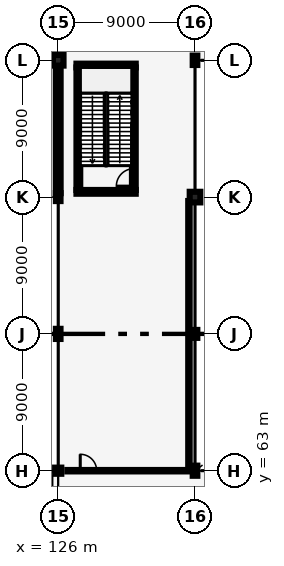
"""IFC4 building model, lengths in metres.
Left out: names, types, materials, properties, quantities, classifications, styles, units other than length and angle.
Written with IfcOpenShell. Run it as: python <this file> out.ifc"""

import sys

from ifc_helpers import new_model, si_unit, direction, frame, frame_2d, origin, origin_2d, place, context, subcontext, project, spatial, rectangle, hollow_circle, i_section, extrude, element, fill, save


model = new_model("IFC4")
c1 = context("Model", 3, precision=1e-05, world=origin(), true_north=direction((0.0, 1.0)))
c2 = subcontext(c1, "Body", "Model", "MODEL_VIEW")
j1 = project(units=[si_unit("LENGTHUNIT", "METRE"), si_unit("PLANEANGLEUNIT", "RADIAN")], contexts=[c1])
p1 = place(None, origin())
s1 = spatial("IfcSite", under=j1, at=p1, CompositionType="ELEMENT")
p2 = place(p1, origin())
s2 = spatial("IfcBuilding", under=s1, at=p2, CompositionType="ELEMENT")
p3 = place(p2, frame((0.0, 0.0, 12.0)))
s3 = spatial("IfcBuildingStorey", under=s2, at=p3, CompositionType="ELEMENT", Elevation=12.0)
p4 = place(p3, frame((126.0, 63.0, 0.0), z_axis=(0.0, 0.0, 1.0), x_axis=(1.0, 0.0, 0.0)))
e1 = element("IfcColumn", 1, at=p4, inside=s3, PredefinedType="COLUMN", context=c2, shape_type="SweptSolid", body=[
    extrude(hollow_circle(Radius=0.203, WallThickness=0.016, at=origin_2d()), origin(), (0.0, 0.0, 1.0), 6.0),
])
p5 = place(p3, frame((126.0, 72.0, 0.0), z_axis=(0.0, 0.0, 1.0), x_axis=(1.0, 0.0, 0.0)))
e2 = element("IfcColumn", 2, at=p5, inside=s3, PredefinedType="COLUMN", context=c2, shape_type="SweptSolid", body=[
    extrude(i_section(OverallWidth=0.305, OverallDepth=0.668, WebThickness=0.021, FlangeThickness=0.04, FilletRadius=0.027, at=origin_2d()), origin(), (0.0, 0.0, 1.0), 6.0),
])
p6 = place(p3, frame((126.0, 81.0, 0.0), z_axis=(0.0, 0.0, 1.0), x_axis=(1.0, 0.0, 0.0)))
e3 = element("IfcColumn", 3, at=p6, inside=s3, PredefinedType="COLUMN", context=c2, shape_type="SweptSolid", body=[
    extrude(i_section(OverallWidth=0.306, OverallDepth=0.524, WebThickness=0.021, FlangeThickness=0.04, FilletRadius=0.027, at=origin_2d()), origin(), (0.0, 0.0, 1.0), 6.0),
])
p7 = place(p3, frame((126.0, 90.0, 0.0), z_axis=(0.0, 0.0, 1.0), x_axis=(1.0, 0.0, 0.0)))
e4 = element("IfcColumn", 4, at=p7, inside=s3, PredefinedType="COLUMN", context=c2, shape_type="SweptSolid", body=[
    extrude(rectangle(XDim=0.7, YDim=0.7, at=origin_2d()), origin(), (0.0, 0.0, 1.0), 6.0),
])
p8 = place(p3, frame((135.0, 63.0, 0.0), z_axis=(0.0, 0.0, 1.0), x_axis=(1.0, 0.0, 0.0)))
e5 = element("IfcColumn", 5, at=p8, inside=s3, PredefinedType="COLUMN", context=c2, shape_type="SweptSolid", body=[
    extrude(i_section(OverallWidth=0.305, OverallDepth=0.668, WebThickness=0.021, FlangeThickness=0.04, FilletRadius=0.027, at=origin_2d()), origin(), (0.0, 0.0, 1.0), 6.0),
])
p9 = place(p3, frame((135.0, 72.0, 0.0), z_axis=(0.0, 0.0, 1.0), x_axis=(1.0, 0.0, 0.0)))
e6 = element("IfcColumn", 6, at=p9, inside=s3, PredefinedType="COLUMN", context=c2, shape_type="SweptSolid", body=[
    extrude(i_section(OverallWidth=0.306, OverallDepth=0.524, WebThickness=0.021, FlangeThickness=0.04, FilletRadius=0.027, at=origin_2d()), origin(), (0.0, 0.0, 1.0), 6.0),
])
p10 = place(p3, frame((135.0, 81.0, 0.0), z_axis=(0.0, 0.0, 1.0), x_axis=(1.0, 0.0, 0.0)))
e7 = element("IfcColumn", 7, at=p10, inside=s3, PredefinedType="COLUMN", context=c2, shape_type="SweptSolid", body=[
    extrude(rectangle(XDim=0.7, YDim=0.7, at=origin_2d()), origin(), (0.0, 0.0, 1.0), 6.0),
])
p11 = place(p3, frame((135.0, 90.0, 0.0), z_axis=(0.0, 0.0, 1.0), x_axis=(1.0, 0.0, 0.0)))
e8 = element("IfcColumn", 8, at=p11, inside=s3, PredefinedType="COLUMN", context=c2, shape_type="SweptSolid", body=[
    extrude(i_section(OverallWidth=0.305, OverallDepth=0.62, WebThickness=0.021, FlangeThickness=0.04, FilletRadius=0.027, at=origin_2d()), origin(), (0.0, 0.0, 1.0), 6.0),
])
p12 = place(p3, frame((126.0, 81.257, 0.0), z_axis=(0.0, 0.0, 1.0), x_axis=(0.0, 1.0, 0.0)))
e9 = element("IfcWall", 9, at=p12, inside=s3, PredefinedType="SOLIDWALL", context=c2, shape_type="SweptSolid", body=[
    extrude(rectangle(XDim=8.398, YDim=0.32, at=frame_2d((4.199, 0.0))), origin(), (0.0, 0.0, 1.0), 4.8),
])
p13 = place(p3, frame((127.325, 81.47, 0.0), z_axis=(0.0, 0.0, 1.0), x_axis=(0.0, 1.0, 0.0)))
e10 = element("IfcWall", 10, at=p13, inside=s3, PredefinedType="SHEAR", context=c2, shape_type="SweptSolid", body=[
    extrude(rectangle(XDim=8.06, YDim=0.25, at=frame_2d((4.03, 0.0))), origin(), (0.0, 0.0, 1.0), 5.64),
])
p14 = place(p3, frame((130.975, 81.47, 0.0), z_axis=(0.0, 0.0, 1.0), x_axis=(0.0, 1.0, 0.0)))
e11 = element("IfcWall", 11, at=p14, inside=s3, PredefinedType="SHEAR", context=c2, shape_type="SweptSolid", body=[
    extrude(rectangle(XDim=8.06, YDim=0.25, at=frame_2d((4.03, 0.0))), origin(), (0.0, 0.0, 1.0), 5.64),
])
p15 = place(p14, frame((0.25, 0.0, 0.0)))
e12 = element("IfcOpeningElement", 12, at=p15, cuts=e11, PredefinedType="OPENING", context=c2, shape_type="SweptSolid", body=[
    extrude(rectangle(XDim=1.15, YDim=2.15, at=frame_2d((0.575, 1.075))), frame((0.0, 0.135, 0.0), z_axis=(0.0, -1.0, 0.0), x_axis=(1.0, 0.0, 0.0)), (0.0, 0.0, 1.0), 0.27),
])
for number, where, z_axis, x_axis in (
    (13, (127.2, 81.345, 0.0), (0.0, 0.0, 1.0), (1.0, 0.0, 0.0)),
    (14, (127.2, 89.655, 0.0), (0.0, 0.0, 1.0), (1.0, 0.0, 0.0)),
):
    element("IfcWall", number, at=place(p3, frame(where, z_axis=z_axis, x_axis=x_axis)), inside=s3, PredefinedType="SHEAR", context=c2, shape_type="SweptSolid", body=[
        extrude(rectangle(XDim=3.9, YDim=0.25, at=frame_2d((1.95, 0.0))), origin(), (0.0, 0.0, 1.0), 5.64),
    ])
p16 = place(p3, frame((126.6, 63.0, 0.0), z_axis=(0.0, 0.0, 1.0), x_axis=(1.0, 0.0, 0.0)))
e15 = element("IfcWall", 15, at=p16, inside=s3, PredefinedType="PARTITIONING", context=c2, shape_type="SweptSolid", body=[
    extrude(rectangle(XDim=8.0, YDim=0.095, at=frame_2d((4.0, 0.0))), origin(), (0.0, 0.0, 1.0), 4.75),
])
p17 = place(p16, frame((0.85, 0.0, 0.0)))
e16 = element("IfcOpeningElement", 16, at=p17, cuts=e15, PredefinedType="OPENING", context=c2, shape_type="SweptSolid", body=[
    extrude(rectangle(XDim=1.08, YDim=2.18, at=frame_2d((0.54, 1.09))), frame((0.0, 0.057, 0.0), z_axis=(0.0, -1.0, 0.0), x_axis=(1.0, 0.0, 0.0)), (0.0, 0.0, 1.0), 0.115),
])
p18 = place(p3, frame((134.6, 63.057, 0.0), z_axis=(0.0, 0.0, 1.0), x_axis=(0.0, 1.0, 0.0)))
e17 = element("IfcWall", 17, at=p18, inside=s3, PredefinedType="PARTITIONING", context=c2, shape_type="SweptSolid", body=[
    extrude(rectangle(XDim=17.686, YDim=0.095, at=frame_2d((8.843, 0.0))), origin(), (0.0, 0.0, 1.0), 4.75),
])
p19 = place(p15, origin())
e18 = element("IfcDoor", 18, at=p19, inside=s3, OperationType="SINGLE_SWING_LEFT", PredefinedType="DOOR", context=c2, shape_type="SweptSolid", body=[
    extrude(rectangle(XDim=1.15, YDim=2.15, at=frame_2d((0.575, 1.075))), frame((0.0, 0.025, 0.0), z_axis=(0.0, -1.0, 0.0), x_axis=(1.0, 0.0, 0.0)), (0.0, 0.0, 1.0), 0.05),
])
fill(e12, e18)
p20 = place(p17, origin())
e19 = element("IfcDoor", 19, at=p20, inside=s3, OperationType="SINGLE_SWING_LEFT", PredefinedType="DOOR", context=c2, shape_type="SweptSolid", body=[
    extrude(rectangle(XDim=1.08, YDim=2.18, at=frame_2d((0.54, 1.09))), frame((0.0, 0.025, 0.0), z_axis=(0.0, -1.0, 0.0), x_axis=(1.0, 0.0, 0.0)), (0.0, 0.0, 1.0), 0.05),
])
fill(e16, e19)
save(model, sys.argv[1])
